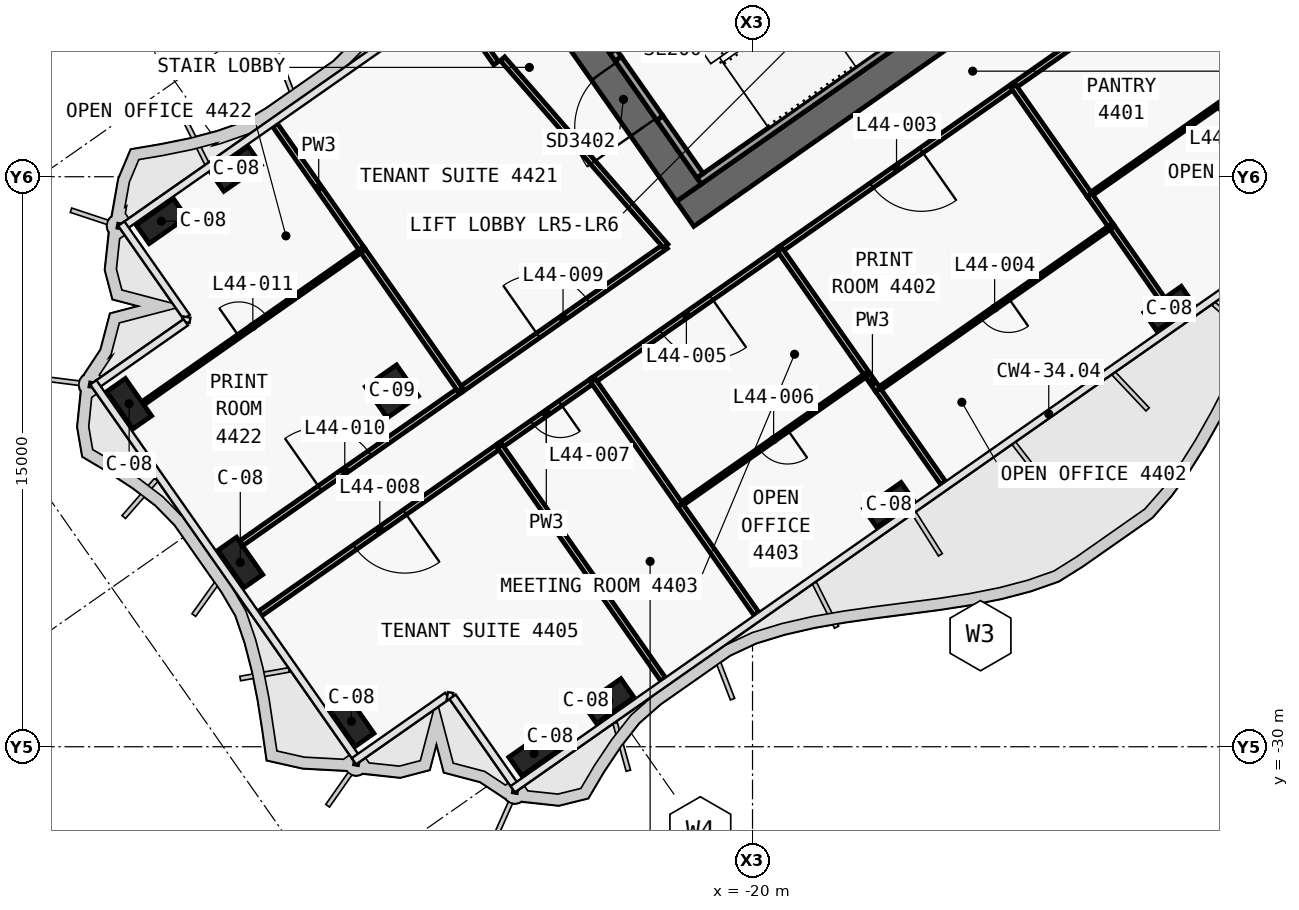
"""IFC4 building model, lengths in metres.
Left out: names, types, materials, properties, quantities, classifications, styles, units other than length and angle.
Written with IfcOpenShell. Run it as: python <this file> out.ifc"""

import sys

from ifc_helpers import new_model, si_unit, direction, frame, frame_2d, origin, origin_2d, place, context, subcontext, project, spatial, polyline, rectangle, outline, extrude, element, fill, save


model = new_model("IFC4")
c1 = context("Model", 3, precision=1e-05, world=origin(), true_north=direction((0.0, 1.0)))
c2 = subcontext(c1, "Body", "Model", "MODEL_VIEW")
j1 = project(units=[si_unit("LENGTHUNIT", "METRE"), si_unit("PLANEANGLEUNIT", "RADIAN")], contexts=[c1])
p1 = place(None, origin())
s1 = spatial("IfcSite", under=j1, at=p1, CompositionType="ELEMENT")
p2 = place(p1, origin())
s2 = spatial("IfcBuilding", under=s1, at=p2, CompositionType="ELEMENT")
p3 = place(p2, frame((0.0, 0.0, 190.5)))
s3 = spatial("IfcBuildingStorey", under=s2, at=p3, CompositionType="ELEMENT", Elevation=190.5)
p4 = place(p3, frame((0.029, -0.712, 0.0), z_axis=(0.0, 0.0, 1.0), x_axis=(-0.819151758019, -0.573576845187, 0.0)))
e1 = element("IfcWall", 1, at=p4, inside=s3, PredefinedType="SHEAR", context=c2, shape_type="SweptSolid", body=[
    extrude(outline(polyline([(26.616, 0.4), (0.56, 0.4), (-0.0, -0.4), (26.616, -0.4), (26.616, 0.4)])), origin(), (0.0, 0.0, 1.0), 3.9),
])
p5 = place(p4, frame((2.966, 0.0, 0.0)))
e2 = element("IfcOpeningElement", 2, at=p5, cuts=e1, PredefinedType="OPENING", context=c2, shape_type="SweptSolid", body=[
    extrude(rectangle(XDim=2.4, YDim=2.1, at=frame_2d((1.2, 1.05))), frame((0.0, 0.41, 0.0), z_axis=(0.0, -1.0, 0.0), x_axis=(1.0, 0.0, 0.0)), (0.0, 0.0, 1.0), 0.82),
])
p6 = place(p4, frame((11.916, 0.0, 0.0)))
e3 = element("IfcOpeningElement", 3, at=p6, cuts=e1, PredefinedType="OPENING", context=c2, shape_type="SweptSolid", body=[
    extrude(rectangle(XDim=2.4, YDim=2.1, at=frame_2d((1.2, 1.05))), frame((0.0, 0.41, 0.0), z_axis=(0.0, -1.0, 0.0), x_axis=(1.0, 0.0, 0.0)), (0.0, 0.0, 1.0), 0.82),
])
p7 = place(p3, frame((-21.675, -15.421, 0.0), z_axis=(0.0, 0.0, 1.0), x_axis=(-0.573581815061, 0.819148278049, 0.0)))
e4 = element("IfcWall", 4, at=p7, inside=s3, PredefinedType="SHEAR", context=c2, shape_type="SweptSolid", body=[
    extrude(outline(polyline([(0.0, 0.4), (0.0, -0.4), (9.6, -0.4), (9.6, 0.4), (0.0, 0.4)])), origin(), (0.0, 0.0, 1.0), 3.9),
])
p8 = place(p7, frame((6.3, 0.0, 0.0)))
e5 = element("IfcOpeningElement", 5, at=p8, cuts=e4, PredefinedType="OPENING", context=c2, shape_type="SweptSolid", body=[
    extrude(rectangle(XDim=1.8, YDim=2.1, at=frame_2d((0.9, 1.05))), frame((0.0, 0.41, 0.0), z_axis=(0.0, -1.0, 0.0), x_axis=(1.0, 0.0, 0.0)), (0.0, 0.0, 1.0), 0.82),
])
p9 = place(p7, frame((2.1, 0.0, 0.0)))
e6 = element("IfcOpeningElement", 6, at=p9, cuts=e4, PredefinedType="OPENING", context=c2, shape_type="SweptSolid", body=[
    extrude(rectangle(XDim=1.8, YDim=2.1, at=frame_2d((0.9, 1.05))), frame((0.0, 0.41, 0.0), z_axis=(0.0, -1.0, 0.0), x_axis=(1.0, 0.0, 0.0)), (0.0, 0.0, 1.0), 0.82),
])
for number, where, z_axis, x_axis in (
    (7, (-9.038, -18.475, 0.0), (0.0, 0.0, 1.0), (-0.819, -0.574, 0.0)),
    (8, (-16.41, -23.637, 0.0), (0.0, 0.0, 1.0), (-0.819, -0.574, 0.0)),
    (9, (-23.782, -28.799, 0.0), (0.0, 0.0, 1.0), (-0.819, -0.574, 0.0)),
    (10, (-25.748, -30.176, 0.0), (0.0, 0.0, 1.0), (-0.819, -0.574, 0.0)),
    (11, (-33.591, -14.792, 0.0), (0.0, 0.0, 1.0), (-0.819, -0.574, 0.0)),
    (12, (-35.556, -16.168, 0.0), (0.0, 0.0, 1.0), (-0.819, -0.574, 0.0)),
    (13, (-30.553, -29.329, 0.0), (0.0, 0.0, 1.0), (-0.574, 0.819, 0.0)),
    (14, (-33.479, -25.151, 0.0), (0.0, 0.0, 1.0), (-0.574, 0.819, 0.0)),
    (15, (-36.404, -20.973, 0.0), (0.0, 0.0, 1.0), (-0.574, 0.819, 0.0)),
):
    element("IfcColumn", number, at=place(p3, frame(where, z_axis=z_axis, x_axis=x_axis)), inside=s3, PredefinedType="COLUMN", context=c2, shape_type="SweptSolid", body=[
        extrude(rectangle(XDim=1.2, YDim=0.6, at=origin_2d()), origin(), (0.0, 0.0, 1.0), 3.9),
    ])
p10 = place(p3, frame((-29.49, -20.649, 0.0), z_axis=(0.0, 0.0, 1.0), x_axis=(-0.819152044289, -0.573576436351, 0.0)))
e16 = element("IfcColumn", 16, at=p10, inside=s3, PredefinedType="COLUMN", context=c2, shape_type="SweptSolid", body=[
    extrude(rectangle(XDim=1.0, YDim=1.0, at=origin_2d()), origin(), (0.0, 0.0, 1.0), 3.9),
])
p11 = place(p3, frame((-14.851, -10.521, 0.0), z_axis=(0.0, 0.0, 1.0), x_axis=(-0.819141584393, -0.57359137434, 0.0)))
e17 = element("IfcWall", 17, at=p11, inside=s3, PredefinedType="SOLIDWALL", context=c2, shape_type="SweptSolid", body=[
    extrude(rectangle(XDim=8.0, YDim=0.2, at=frame_2d((4.0, 0.0))), origin(), (0.0, 0.0, 1.0), 3.62),
])
p12 = place(p3, frame((-21.38, -14.97, 0.0), z_axis=(0.0, 0.0, 1.0), x_axis=(-0.573559770908, 0.819163713305, 0.0)))
e18 = element("IfcWall", 18, at=p12, inside=s3, PredefinedType="SOLIDWALL", context=c2, shape_type="SweptSolid", body=[
    extrude(rectangle(XDim=1.85, YDim=0.2, at=frame_2d((0.925, 0.0))), origin(), (0.0, 0.0, 1.0), 3.62),
])
p13 = place(p3, frame((-23.531, -11.898, 0.0), z_axis=(0.0, 0.0, 1.0), x_axis=(-0.573708088123, 0.819059844958, 0.0)))
e19 = element("IfcWall", 19, at=p13, inside=s3, PredefinedType="SOLIDWALL", context=c2, shape_type="SweptSolid", body=[
    extrude(rectangle(XDim=0.6, YDim=0.2, at=frame_2d((0.3, 0.0))), origin(), (0.0, 0.0, 1.0), 3.62),
])
p14 = place(p3, frame((-22.441, -13.455, 2.15), z_axis=(0.0, 0.0, 1.0), x_axis=(-0.573591692345, 0.819141361715, 0.0)))
e20 = element("IfcWall", 20, at=p14, inside=s3, PredefinedType="SOLIDWALL", context=c2, shape_type="SweptSolid", body=[
    extrude(rectangle(XDim=1.9, YDim=0.2, at=frame_2d((0.95, 0.0))), origin(), (0.0, 0.0, 1.0), 1.47),
])
p15 = place(p3, frame((-27.688, -20.609, 0.0), z_axis=(0.0, 0.0, 1.0), x_axis=(0.819145002073, 0.573586493547, 0.0)))
e21 = element("IfcWall", 21, at=p15, inside=s3, PredefinedType="PARTITIONING", context=c2, shape_type="SweptSolid", body=[
    extrude(rectangle(XDim=6.599, YDim=0.15, at=frame_2d((3.299, 0.0))), origin(), (0.0, 0.0, 1.0), 3.0),
])
p16 = place(p15, frame((2.5, 0.0, 0.0)))
e22 = element("IfcOpeningElement", 22, at=p16, cuts=e21, PredefinedType="OPENING", context=c2, shape_type="SweptSolid", body=[
    extrude(rectangle(XDim=1.6, YDim=2.1, at=frame_2d((0.8, 1.05))), frame((0.0, 0.085, 0.0), z_axis=(0.0, -1.0, 0.0), x_axis=(1.0, 0.0, 0.0)), (0.0, 0.0, 1.0), 0.17),
])
p17 = place(p3, frame((-33.445, -24.64, 0.0), z_axis=(0.0, 0.0, 1.0), x_axis=(0.819135673229, 0.573599815938, 0.0)))
e23 = element("IfcWall", 23, at=p17, inside=s3, PredefinedType="PARTITIONING", context=c2, shape_type="SweptSolid", body=[
    extrude(rectangle(XDim=7.032, YDim=0.15, at=frame_2d((3.516, 0.0))), origin(), (0.0, 0.0, 1.0), 3.0),
])
p18 = place(p17, frame((2.516, 0.0, 0.0)))
e24 = element("IfcOpeningElement", 24, at=p18, cuts=e23, PredefinedType="OPENING", context=c2, shape_type="SweptSolid", body=[
    extrude(rectangle(XDim=1.6, YDim=2.1, at=frame_2d((0.8, 1.05))), frame((0.0, 0.085, 0.0), z_axis=(0.0, -1.0, 0.0), x_axis=(1.0, 0.0, 0.0)), (0.0, 0.0, 1.0), 0.17),
])
p19 = place(p3, frame((-5.766, -7.456, 0.0), z_axis=(0.0, 0.0, 1.0), x_axis=(-0.81915291695, -0.57357519006, 0.0)))
e25 = element("IfcWall", 25, at=p19, inside=s3, PredefinedType="PARTITIONING", context=c2, shape_type="SweptSolid", body=[
    extrude(rectangle(XDim=9.002, YDim=0.15, at=frame_2d((4.501, 0.0))), origin(), (0.0, 0.0, 1.0), 3.0),
])
p20 = place(p19, frame((3.701, 0.0, 0.0)))
e26 = element("IfcOpeningElement", 26, at=p20, cuts=e25, PredefinedType="OPENING", context=c2, shape_type="SweptSolid", body=[
    extrude(rectangle(XDim=1.6, YDim=2.1, at=frame_2d((0.8, 1.05))), frame((0.0, 0.085, 0.0), z_axis=(0.0, -1.0, 0.0), x_axis=(1.0, 0.0, 0.0)), (0.0, 0.0, 1.0), 0.17),
])
p21 = place(p3, frame((-13.137, -12.617, 0.0), z_axis=(0.0, 0.0, 1.0), x_axis=(-0.819153958035, -0.573573703229, 0.0)))
e27 = element("IfcWall", 27, at=p21, inside=s3, PredefinedType="PARTITIONING", context=c2, shape_type="SweptSolid", body=[
    extrude(rectangle(XDim=7.504, YDim=0.15, at=frame_2d((3.752, 0.0))), origin(), (0.0, 0.0, 1.0), 3.0),
])
p22 = place(p21, frame((2.952, 0.0, 0.0)))
e28 = element("IfcOpeningElement", 28, at=p22, cuts=e27, PredefinedType="OPENING", context=c2, shape_type="SweptSolid", body=[
    extrude(rectangle(XDim=1.6, YDim=2.1, at=frame_2d((0.8, 1.05))), frame((0.0, 0.085, 0.0), z_axis=(0.0, -1.0, 0.0), x_axis=(1.0, 0.0, 0.0)), (0.0, 0.0, 1.0), 0.17),
])
p23 = place(p3, frame((-19.281, -16.919, 0.0), z_axis=(0.0, 0.0, 1.0), x_axis=(-0.819145946981, -0.573585144111, 0.0)))
e29 = element("IfcWall", 29, at=p23, inside=s3, PredefinedType="PARTITIONING", context=c2, shape_type="SweptSolid", body=[
    extrude(rectangle(XDim=6.004, YDim=0.15, at=frame_2d((3.002, 0.0))), origin(), (0.0, 0.0, 1.0), 3.0),
])
p24 = place(p23, frame((2.202, 0.0, 0.0)))
e30 = element("IfcOpeningElement", 30, at=p24, cuts=e29, PredefinedType="OPENING", context=c2, shape_type="SweptSolid", body=[
    extrude(rectangle(XDim=1.6, YDim=2.1, at=frame_2d((0.8, 1.05))), frame((0.0, 0.085, 0.0), z_axis=(0.0, -1.0, 0.0), x_axis=(1.0, 0.0, 0.0)), (0.0, 0.0, 1.0), 0.17),
])
p25 = place(p3, frame((-24.196, -20.36, 0.0), z_axis=(0.0, 0.0, 1.0), x_axis=(-0.819128818764, -0.573609604409, 0.0)))
e31 = element("IfcWall", 31, at=p25, inside=s3, PredefinedType="PARTITIONING", context=c2, shape_type="SweptSolid", body=[
    extrude(rectangle(XDim=3.004, YDim=0.15, at=frame_2d((1.502, 0.0))), origin(), (0.0, 0.0, 1.0), 3.62),
])
p26 = place(p25, frame((1.052, 0.0, 0.0)))
e32 = element("IfcOpeningElement", 32, at=p26, cuts=e31, PredefinedType="OPENING", context=c2, shape_type="SweptSolid", body=[
    extrude(rectangle(XDim=0.9, YDim=2.1, at=frame_2d((0.45, 1.05))), frame((0.0, 0.085, 0.0), z_axis=(0.0, -1.0, 0.0), x_axis=(1.0, 0.0, 0.0)), (0.0, 0.0, 1.0), 0.17),
])
p27 = place(p3, frame((-26.653, -22.081, 0.0), z_axis=(0.0, 0.0, 1.0), x_axis=(-0.819148517565, -0.573581473003, 0.0)))
e33 = element("IfcWall", 33, at=p27, inside=s3, PredefinedType="PARTITIONING", context=c2, shape_type="SweptSolid", body=[
    extrude(rectangle(XDim=7.702, YDim=0.15, at=frame_2d((3.851, 0.0))), origin(), (0.0, 0.0, 1.0), 2.9),
])
p28 = place(p27, frame((3.051, 0.0, 0.0)))
e34 = element("IfcOpeningElement", 34, at=p28, cuts=e33, PredefinedType="OPENING", context=c2, shape_type="SweptSolid", body=[
    extrude(rectangle(XDim=1.6, YDim=2.1, at=frame_2d((0.8, 1.05))), frame((0.0, 0.085, 0.0), z_axis=(0.0, -1.0, 0.0), x_axis=(1.0, 0.0, 0.0)), (0.0, 0.0, 1.0), 0.17),
])
p29 = place(p3, frame((-26.746, -12.014, 0.0), z_axis=(0.0, 0.0, 1.0), x_axis=(-0.573568836472, 0.819157365729, 0.0)))
e35 = element("IfcWall", 35, at=p29, inside=s3, PredefinedType="PARTITIONING", context=c2, shape_type="SweptSolid", body=[
    extrude(rectangle(XDim=2.0, YDim=0.15, at=frame_2d((1.0, 0.0))), origin(), (0.0, 0.0, 1.0), 3.0),
])
p30 = place(p3, frame((-22.284, -16.826, 0.0), z_axis=(0.0, 0.0, 1.0), x_axis=(-0.656758142177, 0.754101281449, 0.0)))
e36 = element("IfcWall", 36, at=p30, inside=s3, PredefinedType="PARTITIONING", context=c2, shape_type="SweptSolid", body=[
    extrude(rectangle(XDim=6.539, YDim=0.15, at=frame_2d((3.269, 0.0))), origin(), (0.0, 0.0, 1.0), 3.0),
])
p31 = place(p3, frame((-30.268, -16.922, 0.0), z_axis=(0.0, 0.0, 1.0), x_axis=(-0.573593387921, 0.81914017441, 0.0)))
e37 = element("IfcWall", 37, at=p31, inside=s3, PredefinedType="PARTITIONING", context=c2, shape_type="SweptSolid", body=[
    extrude(rectangle(XDim=4.001, YDim=0.15, at=frame_2d((2.0, 0.0))), origin(), (0.0, 0.0, 1.0), 3.0),
])
p32 = place(p3, frame((-27.687, -20.607, 0.0), z_axis=(0.0, 0.0, 1.0), x_axis=(-0.573553333433, 0.819168220641, 0.0)))
e38 = element("IfcWall", 38, at=p32, inside=s3, PredefinedType="PARTITIONING", context=c2, shape_type="SweptSolid", body=[
    extrude(rectangle(XDim=4.502, YDim=0.15, at=frame_2d((2.251, 0.0))), origin(), (0.0, 0.0, 1.0), 3.0),
])
p33 = place(p3, frame((-36.027, -20.953, 0.0), z_axis=(0.0, 0.0, 1.0), x_axis=(0.819132385288, 0.57360451129, 0.0)))
e39 = element("IfcWall", 39, at=p33, inside=s3, PredefinedType="PARTITIONING", context=c2, shape_type="SweptSolid", body=[
    extrude(rectangle(XDim=7.03, YDim=0.1, at=frame_2d((3.515, 0.0))), origin(), (0.0, 0.0, 1.0), 3.0),
])
p34 = place(p33, frame((3.065, 0.0, 0.0)))
e40 = element("IfcOpeningElement", 40, at=p34, cuts=e39, PredefinedType="OPENING", context=c2, shape_type="SweptSolid", body=[
    extrude(rectangle(XDim=0.9, YDim=2.1, at=frame_2d((0.45, 1.05))), frame((0.0, 0.06, 0.0), z_axis=(0.0, -1.0, 0.0), x_axis=(1.0, 0.0, 0.0)), (0.0, 0.0, 1.0), 0.12),
])
p35 = place(p3, frame((-3.758, -10.324, 0.0), z_axis=(0.0, 0.0, 1.0), x_axis=(-0.819154173185, -0.573573395961, 0.0)))
e41 = element("IfcWall", 41, at=p35, inside=s3, PredefinedType="PARTITIONING", context=c2, shape_type="SweptSolid", body=[
    extrude(rectangle(XDim=9.0, YDim=0.1, at=frame_2d((4.5, 0.0))), origin(), (0.0, 0.0, 1.0), 3.0),
])
p36 = place(p35, frame((4.05, 0.0, 0.0)))
e42 = element("IfcOpeningElement", 42, at=p36, cuts=e41, PredefinedType="OPENING", context=c2, shape_type="SweptSolid", body=[
    extrude(rectangle(XDim=0.9, YDim=2.1, at=frame_2d((0.45, 1.05))), frame((0.0, 0.06, 0.0), z_axis=(0.0, -1.0, 0.0), x_axis=(1.0, 0.0, 0.0)), (0.0, 0.0, 1.0), 0.12),
])
p37 = place(p3, frame((-9.221, -18.213, 0.0), z_axis=(0.0, 0.0, 1.0), x_axis=(-0.573553724287, 0.819167946978, 0.0)))
e43 = element("IfcWall", 43, at=p37, inside=s3, PredefinedType="PARTITIONING", context=c2, shape_type="SweptSolid", body=[
    extrude(rectangle(XDim=2.331, YDim=0.15, at=frame_2d((1.166, 0.0))), origin(), (0.0, 0.0, 1.0), 3.0),
])
p38 = place(p3, frame((-10.556, -16.306, 0.0), z_axis=(0.0, 0.0, 1.0), x_axis=(-0.573576907489, 0.819151714394, 0.0)))
e44 = element("IfcWall", 44, at=p38, inside=s3, PredefinedType="PARTITIONING", context=c2, shape_type="SweptSolid", body=[
    extrude(rectangle(XDim=1.001, YDim=0.15, at=frame_2d((0.5, 0.0))), origin(), (0.0, 0.0, 1.0), 3.0),
])
p39 = place(p3, frame((-11.131, -15.485, 0.0), z_axis=(0.0, 0.0, 1.0), x_axis=(-0.573565328398, 0.819159822049, 0.0)))
e45 = element("IfcWall", 45, at=p39, inside=s3, PredefinedType="PARTITIONING", context=c2, shape_type="SweptSolid", body=[
    extrude(rectangle(XDim=3.5, YDim=0.15, at=frame_2d((1.75, 0.0))), origin(), (0.0, 0.0, 1.0), 3.0),
])
p40 = place(p3, frame((-10.557, -16.305, 0.0), z_axis=(0.0, 0.0, 1.0), x_axis=(-0.81915238829, -0.573575945067, 0.0)))
e46 = element("IfcWall", 46, at=p40, inside=s3, PredefinedType="PARTITIONING", context=c2, shape_type="SweptSolid", body=[
    extrude(rectangle(XDim=7.5, YDim=0.1, at=frame_2d((3.75, 0.0))), origin(), (0.0, 0.0, 1.0), 3.0),
])
p41 = place(p40, frame((3.3, 0.0, 0.0)))
e47 = element("IfcOpeningElement", 47, at=p41, cuts=e46, PredefinedType="OPENING", context=c2, shape_type="SweptSolid", body=[
    extrude(rectangle(XDim=0.9, YDim=2.1, at=frame_2d((0.45, 1.05))), frame((0.0, 0.06, 0.0), z_axis=(0.0, -1.0, 0.0), x_axis=(1.0, 0.0, 0.0)), (0.0, 0.0, 1.0), 0.12),
])
p42 = place(p3, frame((-14.98, -23.063, 0.0), z_axis=(0.0, 0.0, 1.0), x_axis=(-0.573566142353, 0.819159252128, 0.0)))
e48 = element("IfcWall", 48, at=p42, inside=s3, PredefinedType="PARTITIONING", context=c2, shape_type="SweptSolid", body=[
    extrude(rectangle(XDim=2.999, YDim=0.15, at=frame_2d((1.5, 0.0))), origin(), (0.0, 0.0, 1.0), 2.9),
])
p43 = place(p3, frame((-16.701, -20.606, 0.0), z_axis=(0.0, 0.0, 1.0), x_axis=(-0.573233321751, 0.819392188659, 0.0)))
e49 = element("IfcWall", 49, at=p43, inside=s3, PredefinedType="PARTITIONING", context=c2, shape_type="SweptSolid", body=[
    extrude(rectangle(XDim=0.501, YDim=0.15, at=frame_2d((0.25, 0.0))), origin(), (0.0, 0.0, 1.0), 3.62),
])
p44 = place(p3, frame((-16.987, -20.198, 0.0), z_axis=(0.0, 0.0, 1.0), x_axis=(-0.573630198485, 0.819114397008, 0.0)))
e50 = element("IfcWall", 50, at=p44, inside=s3, PredefinedType="PARTITIONING", context=c2, shape_type="SweptSolid", body=[
    extrude(rectangle(XDim=4.002, YDim=0.15, at=frame_2d((2.001, 0.0))), origin(), (0.0, 0.0, 1.0), 3.62),
])
p45 = place(p3, frame((-16.988, -20.197, 0.0), z_axis=(0.0, 0.0, 1.0), x_axis=(-0.819149710902, -0.573579768758, 0.0)))
e51 = element("IfcWall", 51, at=p45, inside=s3, PredefinedType="PARTITIONING", context=c2, shape_type="SweptSolid", body=[
    extrude(rectangle(XDim=6.0, YDim=0.1, at=frame_2d((3.0, 0.0))), origin(), (0.0, 0.0, 1.0), 3.0),
])
p46 = place(p45, frame((2.55, 0.0, 0.0)))
e52 = element("IfcOpeningElement", 52, at=p46, cuts=e51, PredefinedType="OPENING", context=c2, shape_type="SweptSolid", body=[
    extrude(rectangle(XDim=0.9, YDim=2.1, at=frame_2d((0.45, 1.05))), frame((0.0, 0.06, 0.0), z_axis=(0.0, -1.0, 0.0), x_axis=(1.0, 0.0, 0.0)), (0.0, 0.0, 1.0), 0.12),
])
p47 = place(p3, frame((-19.896, -26.505, 0.0), z_axis=(0.0, 0.0, 1.0), x_axis=(-0.573555999232, 0.819166354134, 0.0)))
e53 = element("IfcWall", 53, at=p47, inside=s3, PredefinedType="PARTITIONING", context=c2, shape_type="SweptSolid", body=[
    extrude(rectangle(XDim=3.499, YDim=0.15, at=frame_2d((1.75, 0.0))), origin(), (0.0, 0.0, 1.0), 2.9),
])
p48 = place(p3, frame((-21.903, -23.638, 0.0), z_axis=(0.0, 0.0, 1.0), x_axis=(-0.573556557423, 0.819165963305, 0.0)))
e54 = element("IfcWall", 54, at=p48, inside=s3, PredefinedType="PARTITIONING", context=c2, shape_type="SweptSolid", body=[
    extrude(rectangle(XDim=4.0, YDim=0.15, at=frame_2d((2.0, 0.0))), origin(), (0.0, 0.0, 1.0), 3.62),
])
p49 = place(p3, frame((-22.353, -28.226, 0.0), z_axis=(0.0, 0.0, 1.0), x_axis=(-0.573597787563, 0.819137093595, 0.0)))
e55 = element("IfcWall", 55, at=p49, inside=s3, PredefinedType="PARTITIONING", context=c2, shape_type="SweptSolid", body=[
    extrude(rectangle(XDim=7.5, YDim=0.15, at=frame_2d((3.75, 0.0))), origin(), (0.0, 0.0, 1.0), 2.9),
])
p50 = place(p9, origin())
e56 = element("IfcDoor", 56, at=p50, inside=s3, OperationType="DOUBLE_DOOR_SINGLE_SWING", PredefinedType="DOOR", context=c2, shape_type="SweptSolid", body=[
    extrude(rectangle(XDim=1.8, YDim=2.1, at=frame_2d((0.9, 1.05))), frame((0.0, 0.025, 0.0), z_axis=(0.0, -1.0, 0.0), x_axis=(1.0, 0.0, 0.0)), (0.0, 0.0, 1.0), 0.05),
])
fill(e6, e56)
p51 = place(p36, origin())
e57 = element("IfcDoor", 57, at=p51, inside=s3, OperationType="SINGLE_SWING_LEFT", PredefinedType="DOOR", context=c2, shape_type="SweptSolid", body=[
    extrude(rectangle(XDim=0.9, YDim=2.1, at=frame_2d((0.45, 1.05))), frame((0.0, 0.025, 0.0), z_axis=(0.0, -1.0, 0.0), x_axis=(1.0, 0.0, 0.0)), (0.0, 0.0, 1.0), 0.05),
])
fill(e42, e57)
p52 = place(p22, origin())
e58 = element("IfcDoor", 58, at=p52, inside=s3, OperationType="DOUBLE_DOOR_SINGLE_SWING", PredefinedType="DOOR", context=c2, shape_type="SweptSolid", body=[
    extrude(rectangle(XDim=1.6, YDim=2.1, at=frame_2d((0.8, 1.05))), frame((0.0, 0.025, 0.0), z_axis=(0.0, -1.0, 0.0), x_axis=(1.0, 0.0, 0.0)), (0.0, 0.0, 1.0), 0.05),
])
fill(e28, e58)
p53 = place(p41, origin())
e59 = element("IfcDoor", 59, at=p53, inside=s3, OperationType="SINGLE_SWING_RIGHT", PredefinedType="DOOR", context=c2, shape_type="SweptSolid", body=[
    extrude(rectangle(XDim=0.9, YDim=2.1, at=frame_2d((0.45, 1.05))), frame((0.0, 0.025, 0.0), z_axis=(0.0, -1.0, 0.0), x_axis=(1.0, 0.0, 0.0)), (0.0, 0.0, 1.0), 0.05),
])
fill(e47, e59)
p54 = place(p24, origin())
e60 = element("IfcDoor", 60, at=p54, inside=s3, OperationType="DOUBLE_DOOR_SINGLE_SWING", PredefinedType="DOOR", context=c2, shape_type="SweptSolid", body=[
    extrude(rectangle(XDim=1.6, YDim=2.1, at=frame_2d((0.8, 1.05))), frame((0.0, 0.025, 0.0), z_axis=(0.0, -1.0, 0.0), x_axis=(1.0, 0.0, 0.0)), (0.0, 0.0, 1.0), 0.05),
])
fill(e30, e60)
p55 = place(p46, origin())
e61 = element("IfcDoor", 61, at=p55, inside=s3, OperationType="SINGLE_SWING_RIGHT", PredefinedType="DOOR", context=c2, shape_type="SweptSolid", body=[
    extrude(rectangle(XDim=0.9, YDim=2.1, at=frame_2d((0.45, 1.05))), frame((0.0, 0.025, 0.0), z_axis=(0.0, -1.0, 0.0), x_axis=(1.0, 0.0, 0.0)), (0.0, 0.0, 1.0), 0.05),
])
fill(e52, e61)
p56 = place(p26, origin())
e62 = element("IfcDoor", 62, at=p56, inside=s3, OperationType="SINGLE_SWING_RIGHT", PredefinedType="DOOR", context=c2, shape_type="SweptSolid", body=[
    extrude(rectangle(XDim=0.9, YDim=2.1, at=frame_2d((0.45, 1.05))), frame((0.0, 0.025, 0.0), z_axis=(0.0, -1.0, 0.0), x_axis=(1.0, 0.0, 0.0)), (0.0, 0.0, 1.0), 0.05),
])
fill(e32, e62)
p57 = place(p28, origin())
e63 = element("IfcDoor", 63, at=p57, inside=s3, OperationType="DOUBLE_DOOR_SINGLE_SWING", PredefinedType="DOOR", context=c2, shape_type="SweptSolid", body=[
    extrude(rectangle(XDim=1.6, YDim=2.1, at=frame_2d((0.8, 1.05))), frame((0.0, 0.025, 0.0), z_axis=(0.0, -1.0, 0.0), x_axis=(1.0, 0.0, 0.0)), (0.0, 0.0, 1.0), 0.05),
])
fill(e34, e63)
p58 = place(p16, origin())
e64 = element("IfcDoor", 64, at=p58, inside=s3, OperationType="DOUBLE_DOOR_SINGLE_SWING", PredefinedType="DOOR", context=c2, shape_type="SweptSolid", body=[
    extrude(rectangle(XDim=1.6, YDim=2.1, at=frame_2d((0.8, 1.05))), frame((0.0, 0.025, 0.0), z_axis=(0.0, -1.0, 0.0), x_axis=(1.0, 0.0, 0.0)), (0.0, 0.0, 1.0), 0.05),
])
fill(e22, e64)
p59 = place(p18, origin())
e65 = element("IfcDoor", 65, at=p59, inside=s3, OperationType="DOUBLE_DOOR_SINGLE_SWING", PredefinedType="DOOR", context=c2, shape_type="SweptSolid", body=[
    extrude(rectangle(XDim=1.6, YDim=2.1, at=frame_2d((0.8, 1.05))), frame((0.0, 0.025, 0.0), z_axis=(0.0, -1.0, 0.0), x_axis=(1.0, 0.0, 0.0)), (0.0, 0.0, 1.0), 0.05),
])
fill(e24, e65)
p60 = place(p34, origin())
e66 = element("IfcDoor", 66, at=p60, inside=s3, OperationType="SINGLE_SWING_RIGHT", PredefinedType="DOOR", context=c2, shape_type="SweptSolid", body=[
    extrude(rectangle(XDim=0.9, YDim=2.1, at=frame_2d((0.45, 1.05))), frame((0.0, 0.025, 0.0), z_axis=(0.0, -1.0, 0.0), x_axis=(1.0, 0.0, 0.0)), (0.0, 0.0, 1.0), 0.05),
])
fill(e40, e66)
save(model, sys.argv[1])
